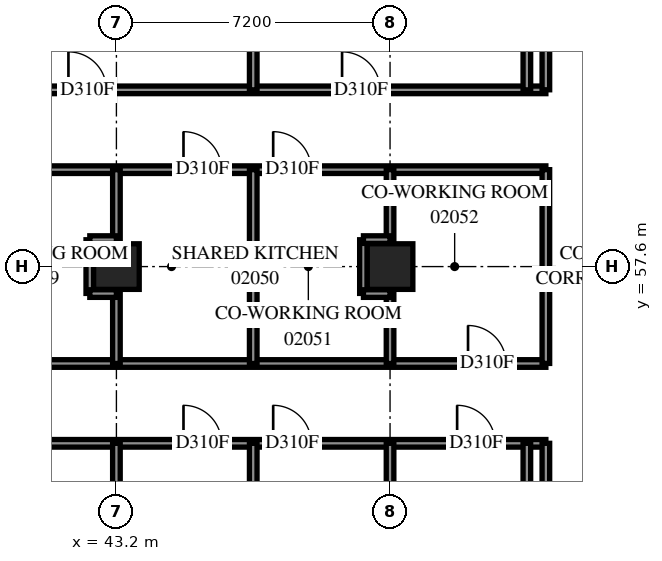
"""IFC4 building model, lengths in metres.
Left out: names, types, materials, properties, quantities, classifications, styles, units other than length and angle.
Written with IfcOpenShell. Run it as: python <this file> out.ifc"""

import sys

from ifc_helpers import new_model, si_unit, direction, frame, frame_2d, origin, origin_2d, place, context, subcontext, project, spatial, rectangle, extrude, element, fill, save


model = new_model("IFC4")
c1 = context("Model", 3, precision=1e-05, world=origin(), true_north=direction((0.0, 1.0)))
c2 = subcontext(c1, "Body", "Model", "MODEL_VIEW")
j1 = project(units=[si_unit("LENGTHUNIT", "METRE"), si_unit("PLANEANGLEUNIT", "RADIAN")], contexts=[c1])
p1 = place(None, origin())
s1 = spatial("IfcSite", under=j1, at=p1, CompositionType="ELEMENT")
p2 = place(p1, origin())
s2 = spatial("IfcBuilding", under=s1, at=p2, CompositionType="ELEMENT")
p3 = place(p2, frame((0.0, 0.0, 10.2)))
s3 = spatial("IfcBuildingStorey", under=s2, at=p3, CompositionType="ELEMENT", Elevation=10.2)
for number, where, z_axis, x_axis in (
    (1, (43.2, 57.6, 0.0), (0.0, 0.0, 1.0), (1.0, 0.0, 0.0)),
    (2, (50.4, 57.6, 0.0), (0.0, 0.0, 1.0), (1.0, 0.0, 0.0)),
):
    element("IfcColumn", number, at=place(p3, frame(where, z_axis=z_axis, x_axis=x_axis)), inside=s3, PredefinedType="COLUMN", context=c2, shape_type="SweptSolid", body=[
        extrude(rectangle(XDim=1.2, YDim=1.2, at=origin_2d()), origin(), (0.0, 0.0, 1.0), 3.8),
    ])
p4 = place(p3, frame((0.0, 55.05, 0.0), z_axis=(0.0, 0.0, 1.0), x_axis=(1.0, 0.0, 0.0)))
e3 = element("IfcWall", 3, at=p4, inside=s3, PredefinedType="PARTITIONING", context=c2, shape_type="SweptSolid", body=[
    extrude(rectangle(XDim=54.5, YDim=0.2, at=frame_2d((27.25, 0.0))), origin(), (0.0, 0.0, 1.0), 3.8),
])
p5 = place(p4, frame((52.452, 0.0, 0.0)))
e4 = element("IfcOpeningElement", 4, at=p5, cuts=e3, PredefinedType="OPENING", context=c2, shape_type="SweptSolid", body=[
    extrude(rectangle(XDim=1.0, YDim=2.1, at=frame_2d((0.5, 1.05))), frame((0.0, 0.11, 0.0), z_axis=(0.0, -1.0, 0.0), x_axis=(1.0, 0.0, 0.0)), (0.0, 0.0, 1.0), 0.22),
])
p6 = place(p4, frame((2.42, 0.0, 0.0)))
e5 = element("IfcOpeningElement", 5, at=p6, cuts=e3, PredefinedType="OPENING", context=c2, shape_type="SweptSolid", body=[
    extrude(rectangle(XDim=1.0, YDim=2.1, at=frame_2d((0.5, 1.05))), frame((0.0, 0.11, 0.0), z_axis=(0.0, -1.0, 0.0), x_axis=(1.0, 0.0, 0.0)), (0.0, 0.0, 1.0), 0.22),
])
p7 = place(p3, frame((0.0, 52.95, 0.0), z_axis=(0.0, 0.0, 1.0), x_axis=(1.0, 0.0, 0.0)))
e6 = element("IfcWall", 6, at=p7, inside=s3, PredefinedType="PARTITIONING", context=c2, shape_type="SweptSolid", body=[
    extrude(rectangle(XDim=54.5, YDim=0.2, at=frame_2d((27.25, 0.0))), origin(), (0.0, 0.0, 1.0), 3.8),
])
p8 = place(p7, frame((8.669, 0.0, 0.0)))
e7 = element("IfcOpeningElement", 7, at=p8, cuts=e6, PredefinedType="OPENING", context=c2, shape_type="SweptSolid", body=[
    extrude(rectangle(XDim=1.0, YDim=2.1, at=frame_2d((0.5, 1.05))), frame((0.0, 0.11, 0.0), z_axis=(0.0, -1.0, 0.0), x_axis=(1.0, 0.0, 0.0)), (0.0, 0.0, 1.0), 0.22),
])
p9 = place(p7, frame((11.307, 0.0, 0.0)))
e8 = element("IfcOpeningElement", 8, at=p9, cuts=e6, PredefinedType="OPENING", context=c2, shape_type="SweptSolid", body=[
    extrude(rectangle(XDim=1.0, YDim=2.1, at=frame_2d((0.5, 1.05))), frame((0.0, 0.11, 0.0), z_axis=(0.0, -1.0, 0.0), x_axis=(1.0, 0.0, 0.0)), (0.0, 0.0, 1.0), 0.22),
])
p10 = place(p7, frame((16.433, 0.0, 0.0)))
e9 = element("IfcOpeningElement", 9, at=p10, cuts=e6, PredefinedType="OPENING", context=c2, shape_type="SweptSolid", body=[
    extrude(rectangle(XDim=1.0, YDim=2.1, at=frame_2d((0.5, 1.05))), frame((0.0, 0.11, 0.0), z_axis=(0.0, -1.0, 0.0), x_axis=(1.0, 0.0, 0.0)), (0.0, 0.0, 1.0), 0.22),
])
p11 = place(p7, frame((22.025, 0.0, 0.0)))
e10 = element("IfcOpeningElement", 10, at=p11, cuts=e6, PredefinedType="OPENING", context=c2, shape_type="SweptSolid", body=[
    extrude(rectangle(XDim=1.0, YDim=2.1, at=frame_2d((0.5, 1.05))), frame((0.0, 0.11, 0.0), z_axis=(0.0, -1.0, 0.0), x_axis=(1.0, 0.0, 0.0)), (0.0, 0.0, 1.0), 0.22),
])
p12 = place(p7, frame((30.565, 0.0, 0.0)))
e11 = element("IfcOpeningElement", 11, at=p12, cuts=e6, PredefinedType="OPENING", context=c2, shape_type="SweptSolid", body=[
    extrude(rectangle(XDim=1.0, YDim=2.1, at=frame_2d((0.5, 1.05))), frame((0.0, 0.11, 0.0), z_axis=(0.0, -1.0, 0.0), x_axis=(1.0, 0.0, 0.0)), (0.0, 0.0, 1.0), 0.22),
])
p13 = place(p7, frame((32.925, 0.0, 0.0)))
e12 = element("IfcOpeningElement", 12, at=p13, cuts=e6, PredefinedType="OPENING", context=c2, shape_type="SweptSolid", body=[
    extrude(rectangle(XDim=1.0, YDim=2.1, at=frame_2d((0.5, 1.05))), frame((0.0, 0.11, 0.0), z_axis=(0.0, -1.0, 0.0), x_axis=(1.0, 0.0, 0.0)), (0.0, 0.0, 1.0), 0.22),
])
p14 = place(p7, frame((37.765, 0.0, 0.0)))
e13 = element("IfcOpeningElement", 13, at=p14, cuts=e6, PredefinedType="OPENING", context=c2, shape_type="SweptSolid", body=[
    extrude(rectangle(XDim=1.0, YDim=2.1, at=frame_2d((0.5, 1.05))), frame((0.0, 0.11, 0.0), z_axis=(0.0, -1.0, 0.0), x_axis=(1.0, 0.0, 0.0)), (0.0, 0.0, 1.0), 0.22),
])
p15 = place(p7, frame((40.125, 0.0, 0.0)))
e14 = element("IfcOpeningElement", 14, at=p15, cuts=e6, PredefinedType="OPENING", context=c2, shape_type="SweptSolid", body=[
    extrude(rectangle(XDim=1.0, YDim=2.1, at=frame_2d((0.5, 1.05))), frame((0.0, 0.11, 0.0), z_axis=(0.0, -1.0, 0.0), x_axis=(1.0, 0.0, 0.0)), (0.0, 0.0, 1.0), 0.22),
])
p16 = place(p7, frame((44.965, 0.0, 0.0)))
e15 = element("IfcOpeningElement", 15, at=p16, cuts=e6, PredefinedType="OPENING", context=c2, shape_type="SweptSolid", body=[
    extrude(rectangle(XDim=1.0, YDim=2.1, at=frame_2d((0.5, 1.05))), frame((0.0, 0.11, 0.0), z_axis=(0.0, -1.0, 0.0), x_axis=(1.0, 0.0, 0.0)), (0.0, 0.0, 1.0), 0.22),
])
p17 = place(p7, frame((47.325, 0.0, 0.0)))
e16 = element("IfcOpeningElement", 16, at=p17, cuts=e6, PredefinedType="OPENING", context=c2, shape_type="SweptSolid", body=[
    extrude(rectangle(XDim=1.0, YDim=2.1, at=frame_2d((0.5, 1.05))), frame((0.0, 0.11, 0.0), z_axis=(0.0, -1.0, 0.0), x_axis=(1.0, 0.0, 0.0)), (0.0, 0.0, 1.0), 0.22),
])
p18 = place(p7, frame((52.165, 0.0, 0.0)))
e17 = element("IfcOpeningElement", 17, at=p18, cuts=e6, PredefinedType="OPENING", context=c2, shape_type="SweptSolid", body=[
    extrude(rectangle(XDim=1.0, YDim=2.1, at=frame_2d((0.5, 1.05))), frame((0.0, 0.11, 0.0), z_axis=(0.0, -1.0, 0.0), x_axis=(1.0, 0.0, 0.0)), (0.0, 0.0, 1.0), 0.22),
])
p19 = place(p7, frame((2.372, 0.0, 0.0)))
e18 = element("IfcOpeningElement", 18, at=p19, cuts=e6, PredefinedType="OPENING", context=c2, shape_type="SweptSolid", body=[
    extrude(rectangle(XDim=1.0, YDim=2.1, at=frame_2d((0.5, 1.05))), frame((0.0, 0.11, 0.0), z_axis=(0.0, -1.0, 0.0), x_axis=(1.0, 0.0, 0.0)), (0.0, 0.0, 1.0), 0.22),
])
p20 = place(p7, frame((4.792, 0.0, 0.0)))
e19 = element("IfcOpeningElement", 19, at=p20, cuts=e6, PredefinedType="OPENING", context=c2, shape_type="SweptSolid", body=[
    extrude(rectangle(XDim=1.0, YDim=2.1, at=frame_2d((0.5, 1.05))), frame((0.0, 0.11, 0.0), z_axis=(0.0, -1.0, 0.0), x_axis=(1.0, 0.0, 0.0)), (0.0, 0.0, 1.0), 0.22),
])
p21 = place(p3, frame((0.002, 60.15, 0.0), z_axis=(0.0, 0.0, 1.0), x_axis=(1.0, 0.0, 0.0)))
e20 = element("IfcWall", 20, at=p21, inside=s3, PredefinedType="PARTITIONING", context=c2, shape_type="SweptSolid", body=[
    extrude(rectangle(XDim=54.498, YDim=0.2, at=frame_2d((27.249, 0.0))), origin(), (0.0, 0.0, 1.0), 3.8),
])
p22 = place(p21, frame((8.667, 0.0, 0.0)))
e21 = element("IfcOpeningElement", 21, at=p22, cuts=e20, PredefinedType="OPENING", context=c2, shape_type="SweptSolid", body=[
    extrude(rectangle(XDim=1.0, YDim=2.1, at=frame_2d((0.5, 1.05))), frame((0.0, 0.11, 0.0), z_axis=(0.0, -1.0, 0.0), x_axis=(1.0, 0.0, 0.0)), (0.0, 0.0, 1.0), 0.22),
])
p23 = place(p21, frame((11.323, 0.0, 0.0)))
e22 = element("IfcOpeningElement", 22, at=p23, cuts=e20, PredefinedType="OPENING", context=c2, shape_type="SweptSolid", body=[
    extrude(rectangle(XDim=1.0, YDim=2.1, at=frame_2d((0.5, 1.05))), frame((0.0, 0.11, 0.0), z_axis=(0.0, -1.0, 0.0), x_axis=(1.0, 0.0, 0.0)), (0.0, 0.0, 1.0), 0.22),
])
p24 = place(p21, frame((16.163, 0.0, 0.0)))
e23 = element("IfcOpeningElement", 23, at=p24, cuts=e20, PredefinedType="OPENING", context=c2, shape_type="SweptSolid", body=[
    extrude(rectangle(XDim=1.0, YDim=2.1, at=frame_2d((0.5, 1.05))), frame((0.0, 0.11, 0.0), z_axis=(0.0, -1.0, 0.0), x_axis=(1.0, 0.0, 0.0)), (0.0, 0.0, 1.0), 0.22),
])
p25 = place(p21, frame((22.14, 0.0, 0.0)))
e24 = element("IfcOpeningElement", 24, at=p25, cuts=e20, PredefinedType="OPENING", context=c2, shape_type="SweptSolid", body=[
    extrude(rectangle(XDim=1.0, YDim=2.1, at=frame_2d((0.5, 1.05))), frame((0.0, 0.11, 0.0), z_axis=(0.0, -1.0, 0.0), x_axis=(1.0, 0.0, 0.0)), (0.0, 0.0, 1.0), 0.22),
])
p26 = place(p21, frame((30.563, 0.0, 0.0)))
e25 = element("IfcOpeningElement", 25, at=p26, cuts=e20, PredefinedType="OPENING", context=c2, shape_type="SweptSolid", body=[
    extrude(rectangle(XDim=1.0, YDim=2.1, at=frame_2d((0.5, 1.05))), frame((0.0, 0.11, 0.0), z_axis=(0.0, -1.0, 0.0), x_axis=(1.0, 0.0, 0.0)), (0.0, 0.0, 1.0), 0.22),
])
p27 = place(p21, frame((33.233, 0.0, 0.0)))
e26 = element("IfcOpeningElement", 26, at=p27, cuts=e20, PredefinedType="OPENING", context=c2, shape_type="SweptSolid", body=[
    extrude(rectangle(XDim=1.0, YDim=2.1, at=frame_2d((0.5, 1.05))), frame((0.0, 0.11, 0.0), z_axis=(0.0, -1.0, 0.0), x_axis=(1.0, 0.0, 0.0)), (0.0, 0.0, 1.0), 0.22),
])
p28 = place(p21, frame((38.073, 0.0, 0.0)))
e27 = element("IfcOpeningElement", 27, at=p28, cuts=e20, PredefinedType="OPENING", context=c2, shape_type="SweptSolid", body=[
    extrude(rectangle(XDim=1.0, YDim=2.1, at=frame_2d((0.5, 1.05))), frame((0.0, 0.11, 0.0), z_axis=(0.0, -1.0, 0.0), x_axis=(1.0, 0.0, 0.0)), (0.0, 0.0, 1.0), 0.22),
])
p29 = place(p21, frame((40.123, 0.0, 0.0)))
e28 = element("IfcOpeningElement", 28, at=p29, cuts=e20, PredefinedType="OPENING", context=c2, shape_type="SweptSolid", body=[
    extrude(rectangle(XDim=1.0, YDim=2.1, at=frame_2d((0.5, 1.05))), frame((0.0, 0.11, 0.0), z_axis=(0.0, -1.0, 0.0), x_axis=(1.0, 0.0, 0.0)), (0.0, 0.0, 1.0), 0.22),
])
p30 = place(p21, frame((44.963, 0.0, 0.0)))
e29 = element("IfcOpeningElement", 29, at=p30, cuts=e20, PredefinedType="OPENING", context=c2, shape_type="SweptSolid", body=[
    extrude(rectangle(XDim=1.0, YDim=2.1, at=frame_2d((0.5, 1.05))), frame((0.0, 0.11, 0.0), z_axis=(0.0, -1.0, 0.0), x_axis=(1.0, 0.0, 0.0)), (0.0, 0.0, 1.0), 0.22),
])
p31 = place(p21, frame((47.323, 0.0, 0.0)))
e30 = element("IfcOpeningElement", 30, at=p31, cuts=e20, PredefinedType="OPENING", context=c2, shape_type="SweptSolid", body=[
    extrude(rectangle(XDim=1.0, YDim=2.1, at=frame_2d((0.5, 1.05))), frame((0.0, 0.11, 0.0), z_axis=(0.0, -1.0, 0.0), x_axis=(1.0, 0.0, 0.0)), (0.0, 0.0, 1.0), 0.22),
])
p32 = place(p21, frame((3.747, 0.0, 0.0)))
e31 = element("IfcOpeningElement", 31, at=p32, cuts=e20, PredefinedType="OPENING", context=c2, shape_type="SweptSolid", body=[
    extrude(rectangle(XDim=1.0, YDim=2.1, at=frame_2d((0.5, 1.05))), frame((0.0, 0.11, 0.0), z_axis=(0.0, -1.0, 0.0), x_axis=(1.0, 0.0, 0.0)), (0.0, 0.0, 1.0), 0.22),
])
p33 = place(p3, frame((0.002, 62.25, 0.0), z_axis=(0.0, 0.0, 1.0), x_axis=(1.0, 0.0, 0.0)))
e32 = element("IfcWall", 32, at=p33, inside=s3, PredefinedType="PARTITIONING", context=c2, shape_type="SweptSolid", body=[
    extrude(rectangle(XDim=54.498, YDim=0.2, at=frame_2d((27.249, 0.0))), origin(), (0.0, 0.0, 1.0), 3.8),
])
p34 = place(p33, frame((8.667, 0.0, 0.0)))
e33 = element("IfcOpeningElement", 33, at=p34, cuts=e32, PredefinedType="OPENING", context=c2, shape_type="SweptSolid", body=[
    extrude(rectangle(XDim=1.0, YDim=2.1, at=frame_2d((0.5, 1.05))), frame((0.0, 0.11, 0.0), z_axis=(0.0, -1.0, 0.0), x_axis=(1.0, 0.0, 0.0)), (0.0, 0.0, 1.0), 0.22),
])
p35 = place(p33, frame((13.136, 0.0, 0.0)))
e34 = element("IfcOpeningElement", 34, at=p35, cuts=e32, PredefinedType="OPENING", context=c2, shape_type="SweptSolid", body=[
    extrude(rectangle(XDim=1.0, YDim=2.1, at=frame_2d((0.5, 1.05))), frame((0.0, 0.11, 0.0), z_axis=(0.0, -1.0, 0.0), x_axis=(1.0, 0.0, 0.0)), (0.0, 0.0, 1.0), 0.22),
])
p36 = place(p33, frame((20.335, 0.0, 0.0)))
e35 = element("IfcOpeningElement", 35, at=p36, cuts=e32, PredefinedType="OPENING", context=c2, shape_type="SweptSolid", body=[
    extrude(rectangle(XDim=1.0, YDim=2.1, at=frame_2d((0.5, 1.05))), frame((0.0, 0.11, 0.0), z_axis=(0.0, -1.0, 0.0), x_axis=(1.0, 0.0, 0.0)), (0.0, 0.0, 1.0), 0.22),
])
p37 = place(p33, frame((27.535, 0.0, 0.0)))
e36 = element("IfcOpeningElement", 36, at=p37, cuts=e32, PredefinedType="OPENING", context=c2, shape_type="SweptSolid", body=[
    extrude(rectangle(XDim=1.0, YDim=2.1, at=frame_2d((0.5, 1.05))), frame((0.0, 0.11, 0.0), z_axis=(0.0, -1.0, 0.0), x_axis=(1.0, 0.0, 0.0)), (0.0, 0.0, 1.0), 0.22),
])
p38 = place(p33, frame((34.736, 0.0, 0.0)))
e37 = element("IfcOpeningElement", 37, at=p38, cuts=e32, PredefinedType="OPENING", context=c2, shape_type="SweptSolid", body=[
    extrude(rectangle(XDim=1.0, YDim=2.1, at=frame_2d((0.5, 1.05))), frame((0.0, 0.11, 0.0), z_axis=(0.0, -1.0, 0.0), x_axis=(1.0, 0.0, 0.0)), (0.0, 0.0, 1.0), 0.22),
])
p39 = place(p33, frame((41.935, 0.0, 0.0)))
e38 = element("IfcOpeningElement", 38, at=p39, cuts=e32, PredefinedType="OPENING", context=c2, shape_type="SweptSolid", body=[
    extrude(rectangle(XDim=1.0, YDim=2.1, at=frame_2d((0.5, 1.05))), frame((0.0, 0.11, 0.0), z_axis=(0.0, -1.0, 0.0), x_axis=(1.0, 0.0, 0.0)), (0.0, 0.0, 1.0), 0.22),
])
p40 = place(p33, frame((49.136, 0.0, 0.0)))
e39 = element("IfcOpeningElement", 39, at=p40, cuts=e32, PredefinedType="OPENING", context=c2, shape_type="SweptSolid", body=[
    extrude(rectangle(XDim=1.0, YDim=2.1, at=frame_2d((0.5, 1.05))), frame((0.0, 0.11, 0.0), z_axis=(0.0, -1.0, 0.0), x_axis=(1.0, 0.0, 0.0)), (0.0, 0.0, 1.0), 0.22),
])
p41 = place(p33, frame((4.799, 0.0, 0.0)))
e40 = element("IfcOpeningElement", 40, at=p41, cuts=e32, PredefinedType="OPENING", context=c2, shape_type="SweptSolid", body=[
    extrude(rectangle(XDim=1.0, YDim=2.1, at=frame_2d((0.5, 1.05))), frame((0.0, 0.11, 0.0), z_axis=(0.0, -1.0, 0.0), x_axis=(1.0, 0.0, 0.0)), (0.0, 0.0, 1.0), 0.22),
])
for number, where, z_axis, x_axis in (
    (41, (46.8, 42.0, 0.0), (0.0, 0.0, 1.0), (0.0, 1.0, 0.0)),
    (42, (54.0, 42.0, 0.0), (0.0, 0.0, 1.0), (0.0, 1.0, 0.0)),
):
    element("IfcWall", number, at=place(p3, frame(where, z_axis=z_axis, x_axis=x_axis)), inside=s3, PredefinedType="PARTITIONING", context=c2, shape_type="SweptSolid", body=[
        extrude(rectangle(XDim=10.95, YDim=0.2, at=frame_2d((5.475, 0.0))), origin(), (0.0, 0.0, 1.0), 3.8),
    ])
for number, where, z_axis, x_axis in (
    (43, (46.8, 62.25, 0.0), (0.0, 0.0, 1.0), (0.0, 1.0, 0.0)),
    (44, (54.0, 62.25, 0.0), (0.0, 0.0, 1.0), (0.0, 1.0, 0.0)),
):
    element("IfcWall", number, at=place(p3, frame(where, z_axis=z_axis, x_axis=x_axis)), inside=s3, PredefinedType="PARTITIONING", context=c2, shape_type="SweptSolid", body=[
        extrude(rectangle(XDim=10.4, YDim=0.2, at=frame_2d((5.2, 0.0))), origin(), (0.0, 0.0, 1.0), 3.8),
    ])
p42 = place(p3, frame((54.5, 47.3, 0.0), z_axis=(0.0, 0.0, 1.0), x_axis=(0.0, 1.0, 0.0)))
e45 = element("IfcWall", 45, at=p42, inside=s3, PredefinedType="PARTITIONING", context=c2, shape_type="SweptSolid", body=[
    extrude(rectangle(XDim=5.65, YDim=0.2, at=frame_2d((2.825, 0.0))), origin(), (0.0, 0.0, 1.0), 3.8),
])
p43 = place(p3, frame((54.5, 62.252, 0.0), z_axis=(0.0, 0.0, 1.0), x_axis=(0.0, 1.0, 0.0)))
e46 = element("IfcWall", 46, at=p43, inside=s3, PredefinedType="PARTITIONING", context=c2, shape_type="SweptSolid", body=[
    extrude(rectangle(XDim=5.648, YDim=0.2, at=frame_2d((2.824, 0.0))), origin(), (0.0, 0.0, 1.0), 3.8),
])
p44 = place(p3, frame((46.8, 55.05, 0.0), z_axis=(0.0, 0.0, 1.0), x_axis=(0.0, 1.0, 0.0)))
e47 = element("IfcWall", 47, at=p44, inside=s3, PredefinedType="PARTITIONING", context=c2, shape_type="SweptSolid", body=[
    extrude(rectangle(XDim=5.1, YDim=0.2, at=frame_2d((2.55, 0.0))), origin(), (0.0, 0.0, 1.0), 3.8),
])
p45 = place(p3, frame((54.5, 55.052, 0.0), z_axis=(0.0, 0.0, 1.0), x_axis=(0.0, 1.0, 0.0)))
e48 = element("IfcWall", 48, at=p45, inside=s3, PredefinedType="PARTITIONING", context=c2, shape_type="SweptSolid", body=[
    extrude(rectangle(XDim=5.098, YDim=0.2, at=frame_2d((2.549, 0.0))), origin(), (0.0, 0.0, 1.0), 3.8),
])
for number, where, z_axis, x_axis in (
    (49, (43.2, 51.106, 0.0), (0.0, 0.0, 1.0), (0.0, 1.0, 0.0)),
    (50, (43.2, 55.05, 0.0), (0.0, 0.0, 1.0), (0.0, 1.0, 0.0)),
    (51, (43.2, 58.306, 0.0), (0.0, 0.0, 1.0), (0.0, 1.0, 0.0)),
    (52, (50.4, 51.106, 0.0), (0.0, 0.0, 1.0), (0.0, 1.0, 0.0)),
    (53, (50.4, 55.05, 0.0), (0.0, 0.0, 1.0), (0.0, 1.0, 0.0)),
    (54, (50.4, 58.306, 0.0), (0.0, 0.0, 1.0), (0.0, 1.0, 0.0)),
):
    element("IfcWall", number, at=place(p3, frame(where, z_axis=z_axis, x_axis=x_axis)), inside=s3, PredefinedType="PARTITIONING", context=c2, shape_type="SweptSolid", body=[
        extrude(rectangle(XDim=1.844, YDim=0.2, at=frame_2d((0.922, 0.0))), origin(), (0.0, 0.0, 1.0), 3.8),
    ])
for number, where, z_axis, x_axis in (
    (55, (42.5, 56.894, 0.0), (0.0, 0.0, 1.0), (0.0, 1.0, 0.0)),
    (56, (49.7, 56.894, 0.0), (0.0, 0.0, 1.0), (0.0, 1.0, 0.0)),
):
    element("IfcWall", number, at=place(p3, frame(where, z_axis=z_axis, x_axis=x_axis)), inside=s3, PredefinedType="PARTITIONING", context=c2, shape_type="SweptSolid", body=[
        extrude(rectangle(XDim=1.412, YDim=0.2, at=frame_2d((0.706, 0.0))), origin(), (0.0, 0.0, 1.0), 3.8),
    ])
for number, where, z_axis, x_axis in (
    (57, (42.5, 58.31, 0.0), (0.0, 0.0, 1.0), (1.0, 0.0, 0.0)),
    (58, (42.5, 56.89, 0.0), (0.0, 0.0, 1.0), (1.0, 0.0, 0.0)),
    (59, (49.7, 58.31, 0.0), (0.0, 0.0, 1.0), (1.0, 0.0, 0.0)),
    (60, (49.7, 56.89, 0.0), (0.0, 0.0, 1.0), (1.0, 0.0, 0.0)),
):
    element("IfcWall", number, at=place(p3, frame(where, z_axis=z_axis, x_axis=x_axis)), inside=s3, PredefinedType="PARTITIONING", context=c2, shape_type="SweptSolid", body=[
        extrude(rectangle(XDim=0.7, YDim=0.2, at=frame_2d((0.35, 0.0))), origin(), (0.0, 0.0, 1.0), 3.8),
    ])
p46 = place(p16, origin())
e61 = element("IfcDoor", 61, at=p46, inside=s3, OperationType="SINGLE_SWING_LEFT", PredefinedType="DOOR", context=c2, shape_type="SweptSolid", body=[
    extrude(rectangle(XDim=1.0, YDim=2.1, at=frame_2d((0.5, 1.05))), frame((0.0, 0.025, 0.0), z_axis=(0.0, -1.0, 0.0), x_axis=(1.0, 0.0, 0.0)), (0.0, 0.0, 1.0), 0.05),
])
fill(e15, e61)
p47 = place(p17, origin())
e62 = element("IfcDoor", 62, at=p47, inside=s3, OperationType="SINGLE_SWING_RIGHT", PredefinedType="DOOR", context=c2, shape_type="SweptSolid", body=[
    extrude(rectangle(XDim=1.0, YDim=2.1, at=frame_2d((0.5, 1.05))), frame((0.0, 0.025, 0.0), z_axis=(0.0, -1.0, 0.0), x_axis=(1.0, 0.0, 0.0)), (0.0, 0.0, 1.0), 0.05),
])
fill(e16, e62)
p48 = place(p18, origin())
e63 = element("IfcDoor", 63, at=p48, inside=s3, OperationType="SINGLE_SWING_LEFT", PredefinedType="DOOR", context=c2, shape_type="SweptSolid", body=[
    extrude(rectangle(XDim=1.0, YDim=2.1, at=frame_2d((0.5, 1.05))), frame((0.0, 0.025, 0.0), z_axis=(0.0, -1.0, 0.0), x_axis=(1.0, 0.0, 0.0)), (0.0, 0.0, 1.0), 0.05),
])
fill(e17, e63)
p49 = place(p30, origin())
e64 = element("IfcDoor", 64, at=p49, inside=s3, OperationType="SINGLE_SWING_LEFT", PredefinedType="DOOR", context=c2, shape_type="SweptSolid", body=[
    extrude(rectangle(XDim=1.0, YDim=2.1, at=frame_2d((0.5, 1.05))), frame((0.0, 0.025, 0.0), z_axis=(0.0, -1.0, 0.0), x_axis=(1.0, 0.0, 0.0)), (0.0, 0.0, 1.0), 0.05),
])
fill(e29, e64)
p50 = place(p31, origin())
e65 = element("IfcDoor", 65, at=p50, inside=s3, OperationType="SINGLE_SWING_RIGHT", PredefinedType="DOOR", context=c2, shape_type="SweptSolid", body=[
    extrude(rectangle(XDim=1.0, YDim=2.1, at=frame_2d((0.5, 1.05))), frame((0.0, 0.025, 0.0), z_axis=(0.0, -1.0, 0.0), x_axis=(1.0, 0.0, 0.0)), (0.0, 0.0, 1.0), 0.05),
])
fill(e30, e65)
p51 = place(p5, origin())
e66 = element("IfcDoor", 66, at=p51, inside=s3, OperationType="SINGLE_SWING_RIGHT", PredefinedType="DOOR", context=c2, shape_type="SweptSolid", body=[
    extrude(rectangle(XDim=1.0, YDim=2.1, at=frame_2d((0.5, 1.05))), frame((0.0, 0.025, 0.0), z_axis=(0.0, -1.0, 0.0), x_axis=(1.0, 0.0, 0.0)), (0.0, 0.0, 1.0), 0.05),
])
fill(e4, e66)
p52 = place(p39, origin())
e67 = element("IfcDoor", 67, at=p52, inside=s3, OperationType="SINGLE_SWING_LEFT", PredefinedType="DOOR", context=c2, shape_type="SweptSolid", body=[
    extrude(rectangle(XDim=1.0, YDim=2.1, at=frame_2d((0.5, 1.05))), frame((0.0, 0.025, 0.0), z_axis=(0.0, -1.0, 0.0), x_axis=(1.0, 0.0, 0.0)), (0.0, 0.0, 1.0), 0.05),
])
fill(e38, e67)
p53 = place(p40, origin())
e68 = element("IfcDoor", 68, at=p53, inside=s3, OperationType="SINGLE_SWING_LEFT", PredefinedType="DOOR", context=c2, shape_type="SweptSolid", body=[
    extrude(rectangle(XDim=1.0, YDim=2.1, at=frame_2d((0.5, 1.05))), frame((0.0, 0.025, 0.0), z_axis=(0.0, -1.0, 0.0), x_axis=(1.0, 0.0, 0.0)), (0.0, 0.0, 1.0), 0.05),
])
fill(e39, e68)
save(model, sys.argv[1])
